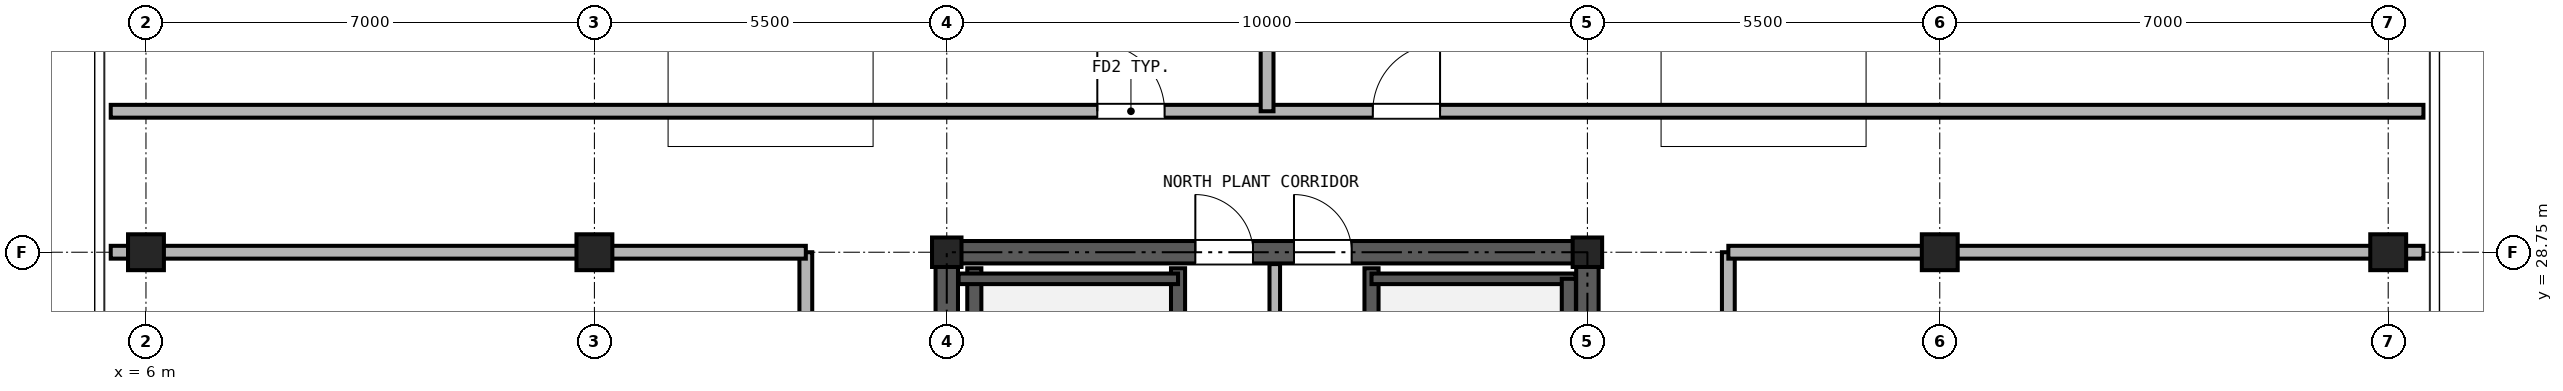
"""IFC4 building model, lengths in metres.
Left out: names, types, materials, properties, quantities, classifications, styles, units other than length and angle.
Written with IfcOpenShell. Run it as: python <this file> out.ifc"""

import sys

from ifc_helpers import new_model, si_unit, direction, frame, frame_2d, origin, origin_2d, place, context, subcontext, project, spatial, rectangle, hollow_rectangle, extrude, source, transform, mapped, element, fill, save


model = new_model("IFC4")
c1 = context("Model", 3, precision=1e-05, world=origin(), true_north=direction((0.0, 1.0)))
c2 = subcontext(c1, "Body", "Model", "MODEL_VIEW")
j1 = project(units=[si_unit("LENGTHUNIT", "METRE"), si_unit("PLANEANGLEUNIT", "RADIAN")], contexts=[c1])
p1 = place(None, origin())
s1 = spatial("IfcSite", under=j1, at=p1, CompositionType="ELEMENT")
p2 = place(p1, origin())
s2 = spatial("IfcBuilding", under=s1, at=p2, CompositionType="ELEMENT")
p3 = place(p2, frame((0.0, 0.0, 271.3)))
s3 = spatial("IfcBuildingStorey", under=s2, at=p3, CompositionType="ELEMENT", Elevation=271.3)
m1 = source(origin(), c2, "Body", "SweptSolid", [
    extrude(hollow_rectangle(XDim=0.56, YDim=0.56, WallThickness=0.03, at=origin_2d()), origin(), (0.0, 0.0, 1.0), 3.38),
])
for number, where, z_axis, x_axis in (
    (1, (6.0, 28.75, 0.0), (0.0, 0.0, 1.0), (1.0, 0.0, 0.0)),
    (2, (41.0, 28.75, 0.0), (0.0, 0.0, 1.0), (1.0, 0.0, 0.0)),
    (3, (13.0, 28.75, 0.0), (0.0, 0.0, 1.0), (1.0, 0.0, 0.0)),
):
    element("IfcColumn", number, at=place(p3, frame(where, z_axis=z_axis, x_axis=x_axis)), inside=s3, PredefinedType="COLUMN", context=c2, shape_type="MappedRepresentation", body=[
        mapped(m1, transform((0.0, 0.0, 0.0), x_axis=(1.0, 0.0, 0.0), y_axis=(0.0, 1.0, 0.0), z_axis=(0.0, 0.0, 1.0), scale=1.0)),
    ])
m2 = source(origin(), c2, "Body", "SweptSolid", [
    extrude(hollow_rectangle(XDim=0.46, YDim=0.46, WallThickness=0.025, at=origin_2d()), origin(), (0.0, 0.0, 1.0), 3.38),
])
for number, where, z_axis, x_axis in (
    (4, (18.5, 28.75, 0.0), (0.0, 0.0, 1.0), (1.0, 0.0, 0.0)),
    (5, (28.5, 28.75, 0.0), (0.0, 0.0, 1.0), (1.0, 0.0, 0.0)),
):
    element("IfcColumn", number, at=place(p3, frame(where, z_axis=z_axis, x_axis=x_axis)), inside=s3, PredefinedType="COLUMN", context=c2, shape_type="MappedRepresentation", body=[
        mapped(m2, transform((0.0, 0.0, 0.0), x_axis=(1.0, 0.0, 0.0), y_axis=(0.0, 1.0, 0.0), z_axis=(0.0, 0.0, 1.0), scale=1.0)),
    ])
p4 = place(p3, frame((34.0, 28.75, 0.0), z_axis=(0.0, 0.0, 1.0), x_axis=(1.0, 0.0, 0.0)))
e6 = element("IfcColumn", 6, at=p4, inside=s3, PredefinedType="COLUMN", context=c2, shape_type="MappedRepresentation", body=[
    mapped(m1, transform((0.0, 0.0, 0.0), x_axis=(1.0, 0.0, 0.0), y_axis=(0.0, 1.0, 0.0), z_axis=(0.0, 0.0, 1.0), scale=1.0)),
])
p5 = place(p3, frame((18.325, 28.75, 0.0), z_axis=(0.0, 0.0, 1.0), x_axis=(1.0, 0.0, 0.0)))
e7 = element("IfcWall", 7, at=p5, inside=s3, PredefinedType="SHEAR", context=c2, shape_type="SweptSolid", body=[
    extrude(rectangle(XDim=10.35, YDim=0.35, at=frame_2d((5.175, 0.0))), origin(), (0.0, 0.0, 1.0), 3.38),
])
p6 = place(p5, frame((4.055, 0.0, 0.0)))
e8 = element("IfcOpeningElement", 8, at=p6, cuts=e7, PredefinedType="OPENING", context=c2, shape_type="SweptSolid", body=[
    extrude(rectangle(XDim=0.9, YDim=2.05, at=frame_2d((0.45, 1.025))), frame((0.0, 0.185, 0.0), z_axis=(0.0, -1.0, 0.0), x_axis=(1.0, 0.0, 0.0)), (0.0, 0.0, 1.0), 0.37),
])
p7 = place(p5, frame((5.595, 0.0, 0.0)))
e9 = element("IfcOpeningElement", 9, at=p7, cuts=e7, PredefinedType="OPENING", context=c2, shape_type="SweptSolid", body=[
    extrude(rectangle(XDim=0.9, YDim=2.05, at=frame_2d((0.45, 1.025))), frame((0.0, 0.185, 0.0), z_axis=(0.0, -1.0, 0.0), x_axis=(1.0, 0.0, 0.0)), (0.0, 0.0, 1.0), 0.37),
])
p8 = place(p3, frame((18.5, 11.675, 0.0), z_axis=(0.0, 0.0, 1.0), x_axis=(0.0, 1.0, 0.0)))
e10 = element("IfcWall", 10, at=p8, inside=s3, PredefinedType="SHEAR", context=c2, shape_type="SweptSolid", body=[
    extrude(rectangle(XDim=16.9, YDim=0.35, at=frame_2d((8.45, 0.0))), origin(), (0.0, 0.0, 1.0), 3.38),
])
p9 = place(p8, frame((7.475, 0.0, 0.0)))
e11 = element("IfcOpeningElement", 11, at=p9, cuts=e10, PredefinedType="OPENING", context=c2, shape_type="SweptSolid", body=[
    extrude(rectangle(XDim=1.15, YDim=2.2, at=frame_2d((0.575, 1.1))), frame((0.0, 0.185, 0.0), z_axis=(0.0, -1.0, 0.0), x_axis=(1.0, 0.0, 0.0)), (0.0, 0.0, 1.0), 0.37),
])
p10 = place(p3, frame((28.5, 11.675, 0.0), z_axis=(0.0, 0.0, 1.0), x_axis=(0.0, 1.0, 0.0)))
e12 = element("IfcWall", 12, at=p10, inside=s3, PredefinedType="SHEAR", context=c2, shape_type="SweptSolid", body=[
    extrude(rectangle(XDim=16.9, YDim=0.35, at=frame_2d((8.45, 0.0))), origin(), (0.0, 0.0, 1.0), 3.38),
])
p11 = place(p10, frame((7.475, 0.0, 0.0)))
e13 = element("IfcOpeningElement", 13, at=p11, cuts=e12, PredefinedType="OPENING", context=c2, shape_type="SweptSolid", body=[
    extrude(rectangle(XDim=1.15, YDim=2.2, at=frame_2d((0.575, 1.1))), frame((0.0, 0.185, 0.0), z_axis=(0.0, -1.0, 0.0), x_axis=(1.0, 0.0, 0.0)), (0.0, 0.0, 1.0), 0.37),
])
for number, where, z_axis, x_axis in (
    (14, (18.93, 21.39, 0.0), (0.0, 0.0, 1.0), (0.0, 1.0, 0.0)),
    (15, (22.11, 21.39, 0.0), (0.0, 0.0, 1.0), (0.0, 1.0, 0.0)),
    (16, (25.13, 21.39, 0.0), (0.0, 0.0, 1.0), (0.0, 1.0, 0.0)),
):
    element("IfcWall", number, at=place(p3, frame(where, z_axis=z_axis, x_axis=x_axis)), inside=s3, PredefinedType="SOLIDWALL", context=c2, shape_type="SweptSolid", body=[
        extrude(rectangle(XDim=7.11, YDim=0.22, at=frame_2d((3.555, 0.0))), origin(), (0.0, 0.0, 1.0), 3.38),
    ])
p12 = place(p3, frame((18.685, 28.335, 0.0), z_axis=(0.0, 0.0, 1.0), x_axis=(1.0, 0.0, 0.0)))
e17 = element("IfcWall", 17, at=p12, inside=s3, PredefinedType="PARTITIONING", context=c2, shape_type="SweptSolid", body=[
    extrude(rectangle(XDim=3.425, YDim=0.165, at=frame_2d((1.712, 0.0))), origin(), (0.0, 0.0, 1.0), 3.38),
])
p13 = place(p3, frame((25.13, 28.335, 0.0), z_axis=(0.0, 0.0, 1.0), x_axis=(1.0, 0.0, 0.0)))
e18 = element("IfcWall", 18, at=p13, inside=s3, PredefinedType="PARTITIONING", context=c2, shape_type="SweptSolid", body=[
    extrude(rectangle(XDim=3.185, YDim=0.165, at=frame_2d((1.593, 0.0))), origin(), (0.0, 0.0, 1.0), 3.38),
])
p14 = place(p3, frame((28.21, 21.39, 0.0), z_axis=(0.0, 0.0, 1.0), x_axis=(0.0, 1.0, 0.0)))
e19 = element("IfcWall", 19, at=p14, inside=s3, PredefinedType="SOLIDWALL", context=c2, shape_type="SweptSolid", body=[
    extrude(rectangle(XDim=6.945, YDim=0.22, at=frame_2d((3.473, 0.0))), origin(), (0.0, 0.0, 1.0), 3.38),
])
p15 = place(p3, frame((23.62, 24.4, 0.0), z_axis=(0.0, 0.0, 1.0), x_axis=(0.0, 1.0, 0.0)))
e20 = element("IfcWall", 20, at=p15, inside=s3, PredefinedType="PARTITIONING", context=c2, shape_type="SweptSolid", body=[
    extrude(rectangle(XDim=4.165, YDim=0.165, at=frame_2d((2.083, 0.0))), origin(), (0.0, 0.0, 1.0), 3.38),
])
p16 = place(p3, frame((5.45, 30.95, 0.0), z_axis=(0.0, 0.0, 1.0), x_axis=(1.0, 0.0, 0.0)))
e21 = element("IfcWall", 21, at=p16, inside=s3, PredefinedType="PARTITIONING", context=c2, shape_type="SweptSolid", body=[
    extrude(rectangle(XDim=36.1, YDim=0.2, at=frame_2d((18.05, 0.0))), origin(), (0.0, 0.0, 1.0), 3.38),
])
p17 = place(p16, frame((15.4, 0.0, 0.0)))
e22 = element("IfcOpeningElement", 22, at=p17, cuts=e21, PredefinedType="OPENING", context=c2, shape_type="SweptSolid", body=[
    extrude(rectangle(XDim=1.05, YDim=2.15, at=frame_2d((0.525, 1.075))), frame((0.0, 0.11, 0.0), z_axis=(0.0, -1.0, 0.0), x_axis=(1.0, 0.0, 0.0)), (0.0, 0.0, 1.0), 0.22),
])
p18 = place(p16, frame((19.7, 0.0, 0.0)))
e23 = element("IfcOpeningElement", 23, at=p18, cuts=e21, PredefinedType="OPENING", context=c2, shape_type="SweptSolid", body=[
    extrude(rectangle(XDim=1.05, YDim=2.15, at=frame_2d((0.525, 1.075))), frame((0.0, 0.11, 0.0), z_axis=(0.0, -1.0, 0.0), x_axis=(1.0, 0.0, 0.0)), (0.0, 0.0, 1.0), 0.22),
])
p19 = place(p3, frame((16.3, 8.9, 0.0), z_axis=(0.0, 0.0, 1.0), x_axis=(0.0, 1.0, 0.0)))
e24 = element("IfcWall", 24, at=p19, inside=s3, PredefinedType="PARTITIONING", context=c2, shape_type="SweptSolid", body=[
    extrude(rectangle(XDim=19.85, YDim=0.2, at=frame_2d((9.925, 0.0))), origin(), (0.0, 0.0, 1.0), 3.38),
])
p20 = place(p19, frame((4.55, 0.0, 0.0)))
e25 = element("IfcOpeningElement", 25, at=p20, cuts=e24, PredefinedType="OPENING", context=c2, shape_type="SweptSolid", body=[
    extrude(rectangle(XDim=1.05, YDim=2.15, at=frame_2d((0.525, 1.075))), frame((0.0, 0.11, 0.0), z_axis=(0.0, -1.0, 0.0), x_axis=(1.0, 0.0, 0.0)), (0.0, 0.0, 1.0), 0.22),
])
p21 = place(p19, frame((14.475, 0.0, 0.0)))
e26 = element("IfcOpeningElement", 26, at=p21, cuts=e24, PredefinedType="OPENING", context=c2, shape_type="SweptSolid", body=[
    extrude(rectangle(XDim=1.05, YDim=2.15, at=frame_2d((0.525, 1.075))), frame((0.0, 0.11, 0.0), z_axis=(0.0, -1.0, 0.0), x_axis=(1.0, 0.0, 0.0)), (0.0, 0.0, 1.0), 0.22),
])
p22 = place(p3, frame((30.7, 8.9, 0.0), z_axis=(0.0, 0.0, 1.0), x_axis=(0.0, 1.0, 0.0)))
e27 = element("IfcWall", 27, at=p22, inside=s3, PredefinedType="PARTITIONING", context=c2, shape_type="SweptSolid", body=[
    extrude(rectangle(XDim=19.85, YDim=0.2, at=frame_2d((9.925, 0.0))), origin(), (0.0, 0.0, 1.0), 3.38),
])
p23 = place(p22, frame((9.425, 0.0, 0.0)))
e28 = element("IfcOpeningElement", 28, at=p23, cuts=e27, PredefinedType="OPENING", context=c2, shape_type="SweptSolid", body=[
    extrude(rectangle(XDim=1.05, YDim=2.15, at=frame_2d((0.525, 1.075))), frame((0.0, 0.11, 0.0), z_axis=(0.0, -1.0, 0.0), x_axis=(1.0, 0.0, 0.0)), (0.0, 0.0, 1.0), 0.22),
])
for number, where, z_axis, x_axis in (
    (29, (5.45, 28.75, 0.0), (0.0, 0.0, 1.0), (1.0, 0.0, 0.0)),
    (30, (30.7, 28.75, 0.0), (0.0, 0.0, 1.0), (1.0, 0.0, 0.0)),
):
    element("IfcWall", number, at=place(p3, frame(where, z_axis=z_axis, x_axis=x_axis)), inside=s3, PredefinedType="PARTITIONING", context=c2, shape_type="SweptSolid", body=[
        extrude(rectangle(XDim=10.85, YDim=0.2, at=frame_2d((5.425, 0.0))), origin(), (0.0, 0.0, 1.0), 2.905),
    ])
p24 = place(p3, frame((23.5, 30.95, 0.0), z_axis=(0.0, 0.0, 1.0), x_axis=(0.0, 1.0, 0.0)))
e31 = element("IfcWall", 31, at=p24, inside=s3, PredefinedType="PARTITIONING", context=c2, shape_type="SweptSolid", body=[
    extrude(rectangle(XDim=4.1, YDim=0.2, at=frame_2d((2.05, 0.0))), origin(), (0.0, 0.0, 1.0), 3.38),
])
p25 = place(p6, origin())
e32 = element("IfcDoor", 32, at=p25, inside=s3, OperationType="SINGLE_SWING_LEFT", PredefinedType="DOOR", context=c2, shape_type="SweptSolid", body=[
    extrude(rectangle(XDim=0.9, YDim=2.05, at=frame_2d((0.45, 1.025))), frame((0.0, 0.025, 0.0), z_axis=(0.0, -1.0, 0.0), x_axis=(1.0, 0.0, 0.0)), (0.0, 0.0, 1.0), 0.05),
])
fill(e8, e32)
p26 = place(p7, origin())
e33 = element("IfcDoor", 33, at=p26, inside=s3, OperationType="SINGLE_SWING_LEFT", PredefinedType="DOOR", context=c2, shape_type="SweptSolid", body=[
    extrude(rectangle(XDim=0.9, YDim=2.05, at=frame_2d((0.45, 1.025))), frame((0.0, 0.025, 0.0), z_axis=(0.0, -1.0, 0.0), x_axis=(1.0, 0.0, 0.0)), (0.0, 0.0, 1.0), 0.05),
])
fill(e9, e33)
p27 = place(p17, origin())
e34 = element("IfcDoor", 34, at=p27, inside=s3, OperationType="SINGLE_SWING_LEFT", PredefinedType="DOOR", context=c2, shape_type="SweptSolid", body=[
    extrude(rectangle(XDim=1.05, YDim=2.15, at=frame_2d((0.525, 1.075))), frame((0.0, 0.025, 0.0), z_axis=(0.0, -1.0, 0.0), x_axis=(1.0, 0.0, 0.0)), (0.0, 0.0, 1.0), 0.05),
])
fill(e22, e34)
p28 = place(p18, origin())
e35 = element("IfcDoor", 35, at=p28, inside=s3, OperationType="SINGLE_SWING_RIGHT", PredefinedType="DOOR", context=c2, shape_type="SweptSolid", body=[
    extrude(rectangle(XDim=1.05, YDim=2.15, at=frame_2d((0.525, 1.075))), frame((0.0, 0.025, 0.0), z_axis=(0.0, -1.0, 0.0), x_axis=(1.0, 0.0, 0.0)), (0.0, 0.0, 1.0), 0.05),
])
fill(e23, e35)
save(model, sys.argv[1])
